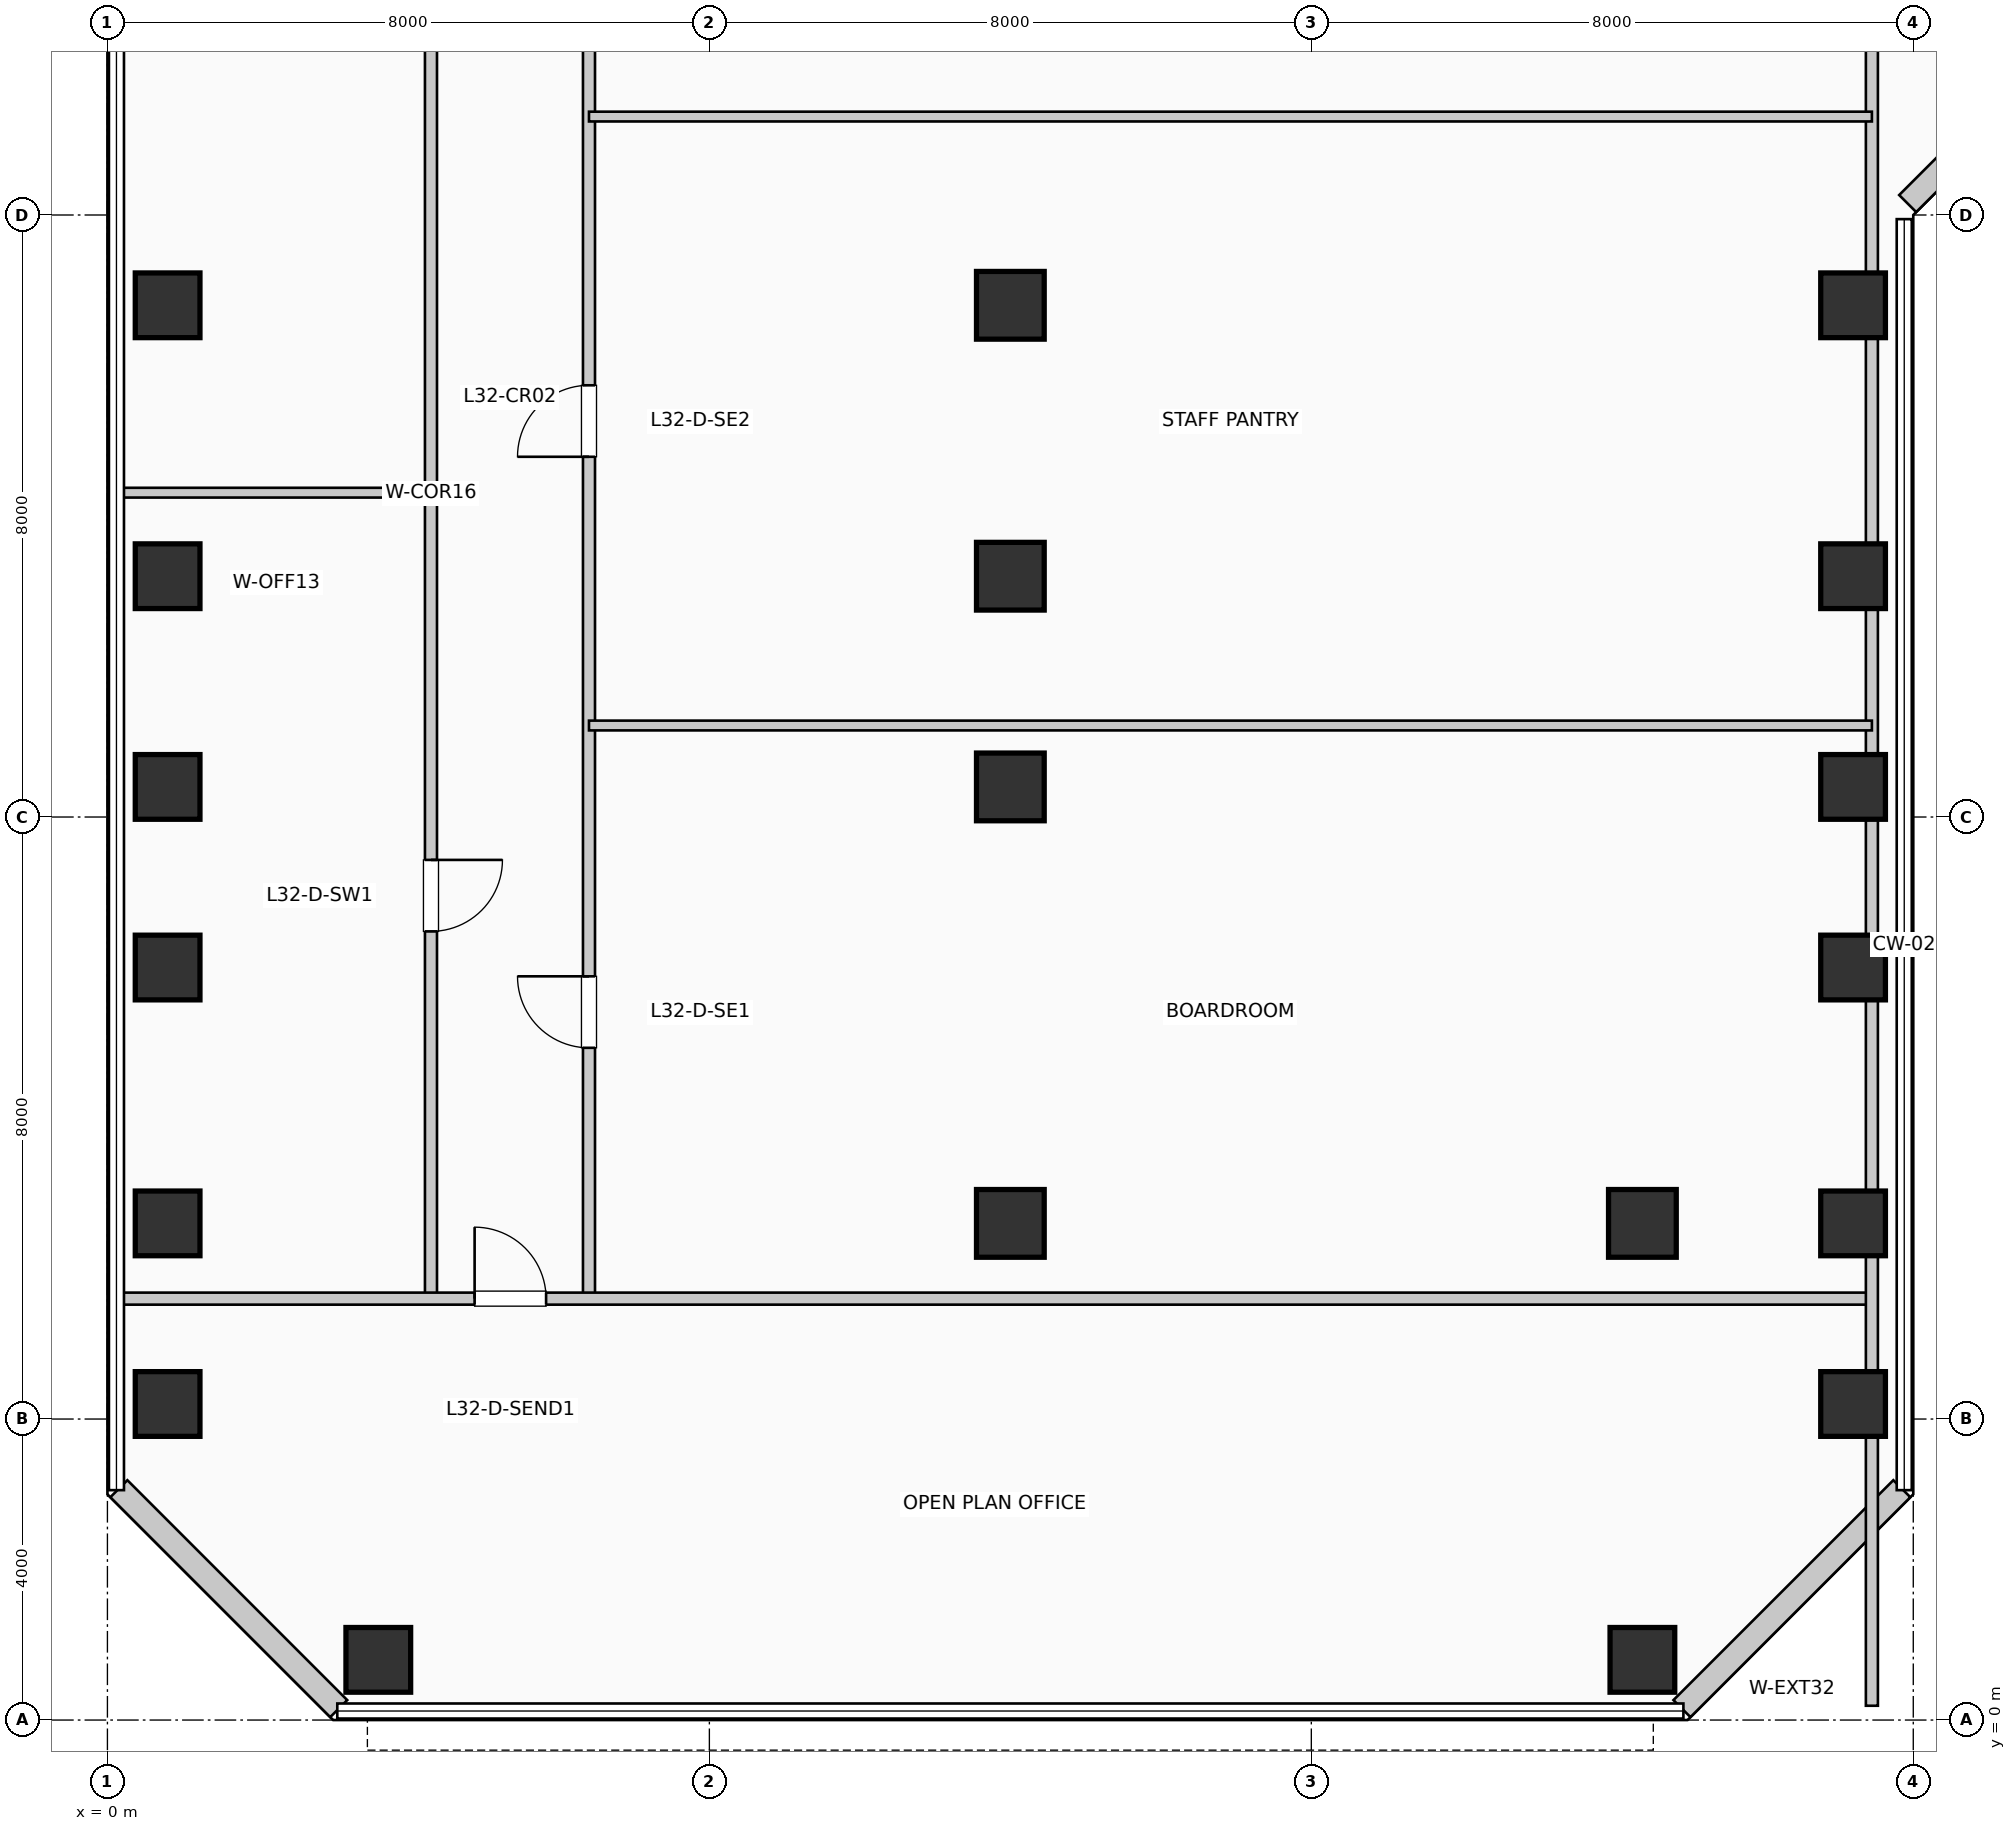
"""IFC4 building model, lengths in metres.
Left out: names, types, materials, properties, quantities, classifications, styles, units other than length and angle.
Written with IfcOpenShell. Run it as: python <this file> out.ifc"""

import sys

from ifc_helpers import new_model, si_unit, direction, frame, frame_2d, origin, origin_2d, place, context, subcontext, project, spatial, rectangle, extrude, element, fill, save


model = new_model("IFC4")
c1 = context("Model", 3, precision=1e-05, world=origin(), true_north=direction((0.0, 1.0)))
c2 = subcontext(c1, "Body", "Model", "MODEL_VIEW")
j1 = project(units=[si_unit("LENGTHUNIT", "METRE"), si_unit("PLANEANGLEUNIT", "RADIAN")], contexts=[c1])
p1 = place(None, origin())
s1 = spatial("IfcSite", under=j1, at=p1, CompositionType="ELEMENT")
p2 = place(p1, origin())
s2 = spatial("IfcBuilding", under=s1, at=p2, CompositionType="ELEMENT")
p3 = place(p2, frame((0.0, 0.0, 134.97)))
s3 = spatial("IfcBuildingStorey", under=s2, at=p3, CompositionType="ELEMENT", Elevation=134.97)
for number, where, z_axis, x_axis in (
    (1, (0.8, 4.2, 0.0), (0.0, 0.0, 1.0), (1.0, 0.0, 0.0)),
    (2, (0.8, 6.6, 0.0), (0.0, 0.0, 1.0), (1.0, 0.0, 0.0)),
    (3, (0.8, 10.0, 0.0), (0.0, 0.0, 1.0), (1.0, 0.0, 0.0)),
    (4, (0.8, 12.4, 0.0), (0.0, 0.0, 1.0), (1.0, 0.0, 0.0)),
    (5, (0.8, 15.2, 0.0), (0.0, 0.0, 1.0), (1.0, 0.0, 0.0)),
    (6, (0.8, 18.8, 0.0), (0.0, 0.0, 1.0), (1.0, 0.0, 0.0)),
    (7, (3.6, 0.8, 0.0), (0.0, 0.0, 1.0), (1.0, 0.0, 0.0)),
):
    element("IfcColumn", number, at=place(p3, frame(where, z_axis=z_axis, x_axis=x_axis)), inside=s3, PredefinedType="COLUMN", context=c2, shape_type="SweptSolid", body=[
        extrude(rectangle(XDim=0.86, YDim=0.86, at=origin_2d()), origin(), (0.0, 0.0, 1.0), 3.96),
    ])
for number, where, z_axis, x_axis in (
    (8, (12.0, 6.6, 0.0), (0.0, 0.0, 1.0), (1.0, 0.0, 0.0)),
    (9, (12.0, 12.4, 0.0), (0.0, 0.0, 1.0), (1.0, 0.0, 0.0)),
    (10, (12.0, 15.2, 0.0), (0.0, 0.0, 1.0), (1.0, 0.0, 0.0)),
    (11, (12.0, 18.8, 0.0), (0.0, 0.0, 1.0), (1.0, 0.0, 0.0)),
):
    element("IfcColumn", number, at=place(p3, frame(where, z_axis=z_axis, x_axis=x_axis)), inside=s3, PredefinedType="COLUMN", context=c2, shape_type="SweptSolid", body=[
        extrude(rectangle(XDim=0.9, YDim=0.9, at=origin_2d()), origin(), (0.0, 0.0, 1.0), 3.96),
    ])
p4 = place(p3, frame((20.4, 0.8, 0.0), z_axis=(0.0, 0.0, 1.0), x_axis=(1.0, 0.0, 0.0)))
e12 = element("IfcColumn", 12, at=p4, inside=s3, PredefinedType="COLUMN", context=c2, shape_type="SweptSolid", body=[
    extrude(rectangle(XDim=0.86, YDim=0.86, at=origin_2d()), origin(), (0.0, 0.0, 1.0), 3.96),
])
p5 = place(p3, frame((20.4, 6.6, 0.0), z_axis=(0.0, 0.0, 1.0), x_axis=(1.0, 0.0, 0.0)))
e13 = element("IfcColumn", 13, at=p5, inside=s3, PredefinedType="COLUMN", context=c2, shape_type="SweptSolid", body=[
    extrude(rectangle(XDim=0.9, YDim=0.9, at=origin_2d()), origin(), (0.0, 0.0, 1.0), 3.96),
])
for number, where, z_axis, x_axis in (
    (14, (23.2, 4.2, 0.0), (0.0, 0.0, 1.0), (1.0, 0.0, 0.0)),
    (15, (23.2, 6.6, 0.0), (0.0, 0.0, 1.0), (1.0, 0.0, 0.0)),
    (16, (23.2, 10.0, 0.0), (0.0, 0.0, 1.0), (1.0, 0.0, 0.0)),
    (17, (23.2, 12.4, 0.0), (0.0, 0.0, 1.0), (1.0, 0.0, 0.0)),
    (18, (23.2, 15.2, 0.0), (0.0, 0.0, 1.0), (1.0, 0.0, 0.0)),
    (19, (23.2, 18.8, 0.0), (0.0, 0.0, 1.0), (1.0, 0.0, 0.0)),
):
    element("IfcColumn", number, at=place(p3, frame(where, z_axis=z_axis, x_axis=x_axis)), inside=s3, PredefinedType="COLUMN", context=c2, shape_type="SweptSolid", body=[
        extrude(rectangle(XDim=0.86, YDim=0.86, at=origin_2d()), origin(), (0.0, 0.0, 1.0), 3.96),
    ])
p6 = place(p3, frame((20.926, 0.152, 0.0), z_axis=(0.0, 0.0, 1.0), x_axis=(0.707106781187, 0.707106781187, 0.0)))
e20 = element("IfcWall", 20, at=p6, inside=s3, PredefinedType="SOLIDWALL", context=c2, shape_type="SweptSolid", body=[
    extrude(rectangle(XDim=4.133, YDim=0.32, at=frame_2d((2.066, 0.0))), origin(), (0.0, 0.0, 1.0), 3.71),
])
p7 = place(p3, frame((23.926, 20.152, 0.0), z_axis=(0.0, 0.0, 1.0), x_axis=(0.707106781187, 0.707106781187, 0.0)))
e21 = element("IfcWall", 21, at=p7, inside=s3, PredefinedType="SOLIDWALL", context=c2, shape_type="SweptSolid", body=[
    extrude(rectangle(XDim=2.718, YDim=0.32, at=frame_2d((1.359, 0.0))), origin(), (0.0, 0.0, 1.0), 3.71),
])
p8 = place(p3, frame((0.152, 3.074, 0.0), z_axis=(0.0, 0.0, 1.0), x_axis=(0.707106781187, -0.707106781187, 0.0)))
e22 = element("IfcWall", 22, at=p8, inside=s3, PredefinedType="SOLIDWALL", context=c2, shape_type="SweptSolid", body=[
    extrude(rectangle(XDim=4.133, YDim=0.32, at=frame_2d((2.066, 0.0))), origin(), (0.0, 0.0, 1.0), 3.71),
])
p9 = place(p3, frame((4.3, 5.6, 0.0), z_axis=(0.0, 0.0, 1.0), x_axis=(0.0, 1.0, 0.0)))
e23 = element("IfcWall", 23, at=p9, inside=s3, PredefinedType="PARTITIONING", context=c2, shape_type="SweptSolid", body=[
    extrude(rectangle(XDim=23.8, YDim=0.16, at=frame_2d((11.9, 0.0))), origin(), (0.0, 0.0, 1.0), 3.71),
])
p10 = place(p9, frame((5.83, 0.0, 0.0), z_axis=(0.0, 0.0, 1.0), x_axis=(-1.0, 0.0, 0.0)))
e24 = element("IfcOpeningElement", 24, at=p10, cuts=e23, PredefinedType="OPENING", context=c2, shape_type="SweptSolid", body=[
    extrude(rectangle(XDim=0.95, YDim=2.15, at=frame_2d((0.475, 1.075))), frame((0.0, 0.09, 0.0), z_axis=(0.0, -1.0, 0.0), x_axis=(1.0, 0.0, 0.0)), (0.0, 0.0, 1.0), 0.18),
])
p11 = place(p9, frame((17.73, 0.0, 0.0), z_axis=(0.0, 0.0, 1.0), x_axis=(-1.0, 0.0, 0.0)))
e25 = element("IfcOpeningElement", 25, at=p11, cuts=e23, PredefinedType="OPENING", context=c2, shape_type="SweptSolid", body=[
    extrude(rectangle(XDim=0.95, YDim=2.15, at=frame_2d((0.475, 1.075))), frame((0.0, 0.09, 0.0), z_axis=(0.0, -1.0, 0.0), x_axis=(1.0, 0.0, 0.0)), (0.0, 0.0, 1.0), 0.18),
])
p12 = place(p3, frame((6.4, 5.6, 0.0), z_axis=(0.0, 0.0, 1.0), x_axis=(0.0, 1.0, 0.0)))
e26 = element("IfcWall", 26, at=p12, inside=s3, PredefinedType="PARTITIONING", context=c2, shape_type="SweptSolid", body=[
    extrude(rectangle(XDim=23.8, YDim=0.16, at=frame_2d((11.9, 0.0))), origin(), (0.0, 0.0, 1.0), 3.71),
])
p13 = place(p12, frame((3.333, 0.0, 0.0)))
e27 = element("IfcOpeningElement", 27, at=p13, cuts=e26, PredefinedType="OPENING", context=c2, shape_type="SweptSolid", body=[
    extrude(rectangle(XDim=0.95, YDim=2.15, at=frame_2d((0.475, 1.075))), frame((0.0, 0.09, 0.0), z_axis=(0.0, -1.0, 0.0), x_axis=(1.0, 0.0, 0.0)), (0.0, 0.0, 1.0), 0.18),
])
p14 = place(p12, frame((11.187, 0.0, 0.0)))
e28 = element("IfcOpeningElement", 28, at=p14, cuts=e26, PredefinedType="OPENING", context=c2, shape_type="SweptSolid", body=[
    extrude(rectangle(XDim=0.95, YDim=2.15, at=frame_2d((0.475, 1.075))), frame((0.0, 0.09, 0.0), z_axis=(0.0, -1.0, 0.0), x_axis=(1.0, 0.0, 0.0)), (0.0, 0.0, 1.0), 0.18),
])
p15 = place(p12, frame((19.279, 0.0, 0.0)))
e29 = element("IfcOpeningElement", 29, at=p15, cuts=e26, PredefinedType="OPENING", context=c2, shape_type="SweptSolid", body=[
    extrude(rectangle(XDim=0.95, YDim=2.15, at=frame_2d((0.475, 1.075))), frame((0.0, 0.09, 0.0), z_axis=(0.0, -1.0, 0.0), x_axis=(1.0, 0.0, 0.0)), (0.0, 0.0, 1.0), 0.18),
])
p16 = place(p3, frame((0.19, 5.6, 0.0), z_axis=(0.0, 0.0, 1.0), x_axis=(1.0, 0.0, 0.0)))
e30 = element("IfcWall", 30, at=p16, inside=s3, PredefinedType="PARTITIONING", context=c2, shape_type="SweptSolid", body=[
    extrude(rectangle(XDim=23.26, YDim=0.16, at=frame_2d((11.63, 0.0))), origin(), (0.0, 0.0, 1.0), 3.71),
])
p17 = place(p16, frame((4.69, 0.0, 0.0)))
e31 = element("IfcOpeningElement", 31, at=p17, cuts=e30, PredefinedType="OPENING", context=c2, shape_type="SweptSolid", body=[
    extrude(rectangle(XDim=0.95, YDim=2.15, at=frame_2d((0.475, 1.075))), frame((0.0, 0.09, 0.0), z_axis=(0.0, -1.0, 0.0), x_axis=(1.0, 0.0, 0.0)), (0.0, 0.0, 1.0), 0.18),
])
p18 = place(p3, frame((23.45, 0.19, 0.0), z_axis=(0.0, 0.0, 1.0), x_axis=(0.0, 1.0, 0.0)))
e32 = element("IfcWall", 32, at=p18, inside=s3, PredefinedType="PARTITIONING", context=c2, shape_type="SweptSolid", body=[
    extrude(rectangle(XDim=29.21, YDim=0.16, at=frame_2d((14.605, 0.0))), origin(), (0.0, 0.0, 1.0), 3.045),
])
p19 = place(p3, frame((0.19, 16.31, 0.0), z_axis=(0.0, 0.0, 1.0), x_axis=(1.0, 0.0, 0.0)))
e33 = element("IfcWall", 33, at=p19, inside=s3, PredefinedType="PARTITIONING", context=c2, shape_type="SweptSolid", body=[
    extrude(rectangle(XDim=4.11, YDim=0.13, at=frame_2d((2.055, 0.0))), origin(), (0.0, 0.0, 1.0), 3.71),
])
for number, where, z_axis, x_axis in (
    (34, (6.4, 13.216, 0.0), (0.0, 0.0, 1.0), (1.0, 0.0, 0.0)),
    (35, (6.4, 21.308, 0.0), (0.0, 0.0, 1.0), (1.0, 0.0, 0.0)),
):
    element("IfcWall", number, at=place(p3, frame(where, z_axis=z_axis, x_axis=x_axis)), inside=s3, PredefinedType="PARTITIONING", context=c2, shape_type="SweptSolid", body=[
        extrude(rectangle(XDim=17.05, YDim=0.13, at=frame_2d((8.525, 0.0))), origin(), (0.0, 0.0, 1.0), 3.71),
    ])
p20 = place(p17, origin())
e36 = element("IfcDoor", 36, at=p20, inside=s3, OperationType="SINGLE_SWING_LEFT", PredefinedType="DOOR", context=c2, shape_type="SweptSolid", body=[
    extrude(rectangle(XDim=0.95, YDim=2.15, at=frame_2d((0.475, 1.075))), frame((0.0, 0.025, 0.0), z_axis=(0.0, -1.0, 0.0), x_axis=(1.0, 0.0, 0.0)), (0.0, 0.0, 1.0), 0.05),
])
fill(e31, e36)
p21 = place(p10, origin())
e37 = element("IfcDoor", 37, at=p21, inside=s3, OperationType="SINGLE_SWING_RIGHT", PredefinedType="DOOR", context=c2, shape_type="SweptSolid", body=[
    extrude(rectangle(XDim=0.95, YDim=2.15, at=frame_2d((0.475, 1.075))), frame((0.0, 0.025, 0.0), z_axis=(0.0, -1.0, 0.0), x_axis=(1.0, 0.0, 0.0)), (0.0, 0.0, 1.0), 0.05),
])
fill(e24, e37)
p22 = place(p13, origin())
e38 = element("IfcDoor", 38, at=p22, inside=s3, OperationType="SINGLE_SWING_RIGHT", PredefinedType="DOOR", context=c2, shape_type="SweptSolid", body=[
    extrude(rectangle(XDim=0.95, YDim=2.15, at=frame_2d((0.475, 1.075))), frame((0.0, 0.025, 0.0), z_axis=(0.0, -1.0, 0.0), x_axis=(1.0, 0.0, 0.0)), (0.0, 0.0, 1.0), 0.05),
])
fill(e27, e38)
p23 = place(p14, origin())
e39 = element("IfcDoor", 39, at=p23, inside=s3, OperationType="SINGLE_SWING_LEFT", PredefinedType="DOOR", context=c2, shape_type="SweptSolid", body=[
    extrude(rectangle(XDim=0.95, YDim=2.15, at=frame_2d((0.475, 1.075))), frame((0.0, 0.025, 0.0), z_axis=(0.0, -1.0, 0.0), x_axis=(1.0, 0.0, 0.0)), (0.0, 0.0, 1.0), 0.05),
])
fill(e28, e39)
save(model, sys.argv[1])
